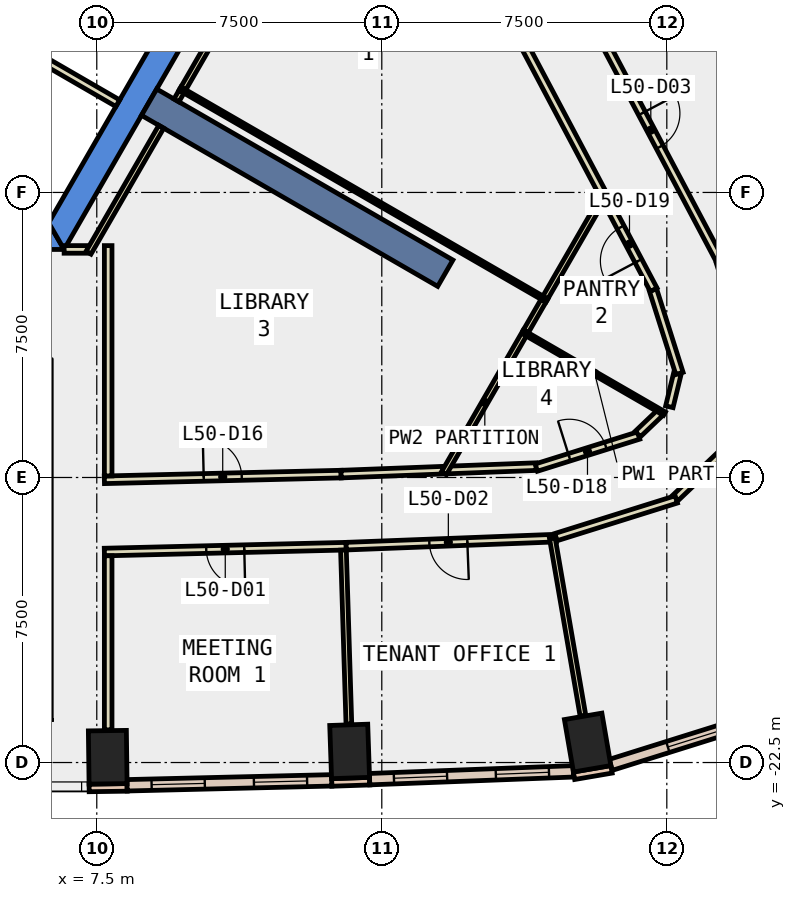
"""IFC4 building model, lengths in metres.
Left out: names, types, materials, properties, quantities, classifications, styles, units other than length and angle.
Written with IfcOpenShell. Run it as: python <this file> out.ifc"""

import sys

from ifc_helpers import new_model, si_unit, direction, frame, frame_2d, origin, origin_2d, place, context, subcontext, project, spatial, polyline, rectangle, outline, extrude, element, fill, save


model = new_model("IFC4")
c1 = context("Model", 3, precision=1e-05, world=origin(), true_north=direction((0.0, 1.0)))
c2 = subcontext(c1, "Body", "Model", "MODEL_VIEW")
j1 = project(units=[si_unit("LENGTHUNIT", "METRE"), si_unit("PLANEANGLEUNIT", "RADIAN")], contexts=[c1])
p1 = place(None, origin())
s1 = spatial("IfcSite", under=j1, at=p1, CompositionType="ELEMENT")
p2 = place(p1, origin())
s2 = spatial("IfcBuilding", under=s1, at=p2, CompositionType="ELEMENT")
p3 = place(p2, frame((0.0, 0.0, 223.4)))
s3 = spatial("IfcBuildingStorey", under=s2, at=p3, CompositionType="ELEMENT", Elevation=223.4)
for number, where, z_axis, x_axis in (
    (1, (7.788, -22.361, -0.4), (0.0, 0.0, 1.0), (1.0, 0.013, 0.0)),
    (2, (14.154, -22.208, -0.4), (0.0, 0.0, 1.0), (0.999, 0.034, 0.0)),
    (3, (20.417, -21.975, -0.4), (0.0, 0.0, 1.0), (0.986, 0.169, 0.0)),
):
    element("IfcColumn", number, at=place(p3, frame(where, z_axis=z_axis, x_axis=x_axis)), inside=s3, PredefinedType="COLUMN", context=c2, shape_type="SweptSolid", body=[
        extrude(rectangle(XDim=1.0, YDim=1.4, at=origin_2d()), origin(), (0.0, 0.0, 1.0), 4.2),
    ])
p4 = place(p3, frame((0.0, 0.0, -0.4)))
e4 = element("IfcWall", 4, at=p4, inside=s3, PredefinedType="SHEAR", context=c2, shape_type="SweptSolid", body=[
    extrude(outline(polyline([(5.75, -8.3), (5.75, -9.0), (6.64, -9.0), (6.235, -8.3), (5.75, -8.3)])), origin(), (0.0, 0.0, 1.0), 4.2),
])
p5 = place(p3, frame((0.0, 0.0, -0.4)))
e5 = element("IfcWall", 5, at=p5, inside=s3, PredefinedType="SHEAR", context=c2, shape_type="SweptSolid", body=[
    extrude(outline(polyline([(6.64, -9.0), (13.279, 2.5), (12.471, 2.5), (6.235, -8.3), (6.64, -9.0)])), origin(), (0.0, 0.0, 1.0), 4.2),
])
p6 = place(p3, frame((8.877, -5.125, -0.4), z_axis=(0.0, 0.0, 1.0), x_axis=(0.866017533419, -0.500013631625, 0.0)))
e6 = element("IfcWall", 6, at=p6, inside=s3, PredefinedType="SHEAR", context=c2, shape_type="SweptSolid", body=[
    extrude(rectangle(XDim=9.0, YDim=0.8, at=frame_2d((4.5, 0.0))), origin(), (0.0, 0.0, 1.0), 4.2),
])
p7 = place(p3, frame((7.299, -23.168, 0.0), z_axis=(0.0, 0.0, 1.0), x_axis=(0.999903186316, 0.013914668364, 0.0)))
e7 = element("IfcWall", 7, at=p7, inside=s3, PredefinedType="STANDARD", context=c2, shape_type="SweptSolid", body=[
    extrude(rectangle(XDim=1.0, YDim=0.2, at=frame_2d((0.5, 0.0))), origin(), (0.0, 0.0, 1.0), 3.8),
])
p8 = place(p3, frame((13.682, -23.024, 0.0), z_axis=(0.0, 0.0, 1.0), x_axis=(0.999423561854, 0.033949138587, 0.0)))
e8 = element("IfcWall", 8, at=p8, inside=s3, PredefinedType="STANDARD", context=c2, shape_type="SweptSolid", body=[
    extrude(rectangle(XDim=1.0, YDim=0.2, at=frame_2d((0.5, 0.0))), origin(), (0.0, 0.0, 1.0), 3.8),
])
p9 = place(p3, frame((20.059, -22.848, 0.0), z_axis=(0.0, 0.0, 1.0), x_axis=(0.985631544579, 0.168909615862, 0.0)))
e9 = element("IfcWall", 9, at=p9, inside=s3, PredefinedType="STANDARD", context=c2, shape_type="SweptSolid", body=[
    extrude(rectangle(XDim=1.0, YDim=0.2, at=frame_2d((0.5, 0.0))), origin(), (0.0, 0.0, 1.0), 3.8),
])
p10 = place(p3, frame((8.297, -23.099, 0.0), z_axis=(0.0, 0.0, 1.0), x_axis=(0.999708030006, 0.024163086341, 0.0)))
e10 = element("IfcWall", 10, at=p10, inside=s3, PredefinedType="STANDARD", context=c2, shape_type="SweptSolid", body=[
    extrude(rectangle(XDim=5.385, YDim=0.3, at=frame_2d((2.693, 0.0))), origin(), (0.0, 0.0, 1.0), 3.8),
])
p11 = place(p10, frame((0.646, 0.0, 0.9)))
e11 = element("IfcOpeningElement", 11, at=p11, cuts=e10, PredefinedType="OPENING", context=c2, shape_type="SweptSolid", body=[
    extrude(rectangle(XDim=1.4, YDim=2.6, at=frame_2d((0.7, 1.3))), frame((0.0, 0.16, 0.0), z_axis=(0.0, -1.0, 0.0), x_axis=(1.0, 0.0, 0.0)), (0.0, 0.0, 1.0), 0.32),
])
p12 = place(p10, frame((3.339, 0.0, 0.9)))
e12 = element("IfcOpeningElement", 12, at=p12, cuts=e10, PredefinedType="OPENING", context=c2, shape_type="SweptSolid", body=[
    extrude(rectangle(XDim=1.4, YDim=2.6, at=frame_2d((0.7, 1.3))), frame((0.0, 0.16, 0.0), z_axis=(0.0, -1.0, 0.0), x_axis=(1.0, 0.0, 0.0)), (0.0, 0.0, 1.0), 0.32),
])
p13 = place(p3, frame((14.679, -22.938, 0.0), z_axis=(0.0, 0.0, 1.0), x_axis=(0.99926218254, 0.038406907512, 0.0)))
e13 = element("IfcWall", 13, at=p13, inside=s3, PredefinedType="STANDARD", context=c2, shape_type="SweptSolid", body=[
    extrude(rectangle(XDim=5.365, YDim=0.3, at=frame_2d((2.683, 0.0))), origin(), (0.0, 0.0, 1.0), 3.8),
])
p14 = place(p13, frame((0.641, 0.0, 0.9)))
e14 = element("IfcOpeningElement", 14, at=p14, cuts=e13, PredefinedType="OPENING", context=c2, shape_type="SweptSolid", body=[
    extrude(rectangle(XDim=1.4, YDim=2.6, at=frame_2d((0.7, 1.3))), frame((0.0, 0.16, 0.0), z_axis=(0.0, -1.0, 0.0), x_axis=(1.0, 0.0, 0.0)), (0.0, 0.0, 1.0), 0.32),
])
p15 = place(p13, frame((3.324, 0.0, 0.9)))
e15 = element("IfcOpeningElement", 15, at=p15, cuts=e13, PredefinedType="OPENING", context=c2, shape_type="SweptSolid", body=[
    extrude(rectangle(XDim=1.4, YDim=2.6, at=frame_2d((0.7, 1.3))), frame((0.0, 0.16, 0.0), z_axis=(0.0, -1.0, 0.0), x_axis=(1.0, 0.0, 0.0)), (0.0, 0.0, 1.0), 0.32),
])
p16 = place(p3, frame((21.024, -22.562, 0.0), z_axis=(0.0, 0.0, 1.0), x_axis=(0.954297481837, 0.298858354675, 0.0)))
e16 = element("IfcWall", 16, at=p16, inside=s3, PredefinedType="STANDARD", context=c2, shape_type="SweptSolid", body=[
    extrude(rectangle(XDim=4.551, YDim=0.3, at=frame_2d((2.275, 0.0))), origin(), (0.0, 0.0, 1.0), 3.8),
])
p17 = place(p16, frame((1.575, 0.0, 0.9)))
e17 = element("IfcOpeningElement", 17, at=p17, cuts=e16, PredefinedType="OPENING", context=c2, shape_type="SweptSolid", body=[
    extrude(rectangle(XDim=1.4, YDim=2.6, at=frame_2d((0.7, 1.3))), frame((0.0, 0.16, 0.0), z_axis=(0.0, -1.0, 0.0), x_axis=(1.0, 0.0, 0.0)), (0.0, 0.0, 1.0), 0.32),
])
p18 = place(p3, frame((7.7, -15.061, 0.0), z_axis=(0.0, 0.0, 1.0), x_axis=(0.999709615165, 0.024097413707, 0.0)))
e18 = element("IfcWall", 18, at=p18, inside=s3, PredefinedType="PARTITIONING", context=c2, shape_type="SweptSolid", body=[
    extrude(rectangle(XDim=6.231, YDim=0.2, at=frame_2d((3.115, 0.0))), origin(), (0.0, 0.0, 1.0), 3.8),
])
p19 = place(p18, frame((2.615, 0.0, 0.0)))
e19 = element("IfcOpeningElement", 19, at=p19, cuts=e18, PredefinedType="OPENING", context=c2, shape_type="SweptSolid", body=[
    extrude(rectangle(XDim=1.0, YDim=2.1, at=frame_2d((0.5, 1.05))), frame((0.0, 0.11, 0.0), z_axis=(0.0, -1.0, 0.0), x_axis=(1.0, 0.0, 0.0)), (0.0, 0.0, 1.0), 0.22),
])
p20 = place(p3, frame((13.929, -14.911, 0.0), z_axis=(0.0, 0.0, 1.0), x_axis=(0.99926480204, 0.038338693307, 0.0)))
e20 = element("IfcWall", 20, at=p20, inside=s3, PredefinedType="PARTITIONING", context=c2, shape_type="SweptSolid", body=[
    extrude(rectangle(XDim=2.681, YDim=0.2, at=frame_2d((1.34, 0.0))), origin(), (0.0, 0.0, 1.0), 3.8),
])
p21 = place(p3, frame((20.882, -7.659, 0.0), z_axis=(0.0, 0.0, 1.0), x_axis=(-0.468206254133, 0.883619207346, 0.0)))
e21 = element("IfcWall", 21, at=p21, inside=s3, PredefinedType="PARTITIONING", context=c2, shape_type="SweptSolid", body=[
    extrude(rectangle(XDim=4.93, YDim=0.2, at=frame_2d((2.465, 0.0))), origin(), (0.0, 0.0, 1.0), 3.8),
])
p22 = place(p3, frame((16.757, -14.802, 0.0), z_axis=(0.0, 0.0, 1.0), x_axis=(0.999273784151, 0.038103862122, 0.0)))
e22 = element("IfcWall", 22, at=p22, inside=s3, PredefinedType="PARTITIONING", context=c2, shape_type="SweptSolid", body=[
    extrude(rectangle(XDim=2.307, YDim=0.2, at=frame_2d((1.153, 0.0))), origin(), (0.0, 0.0, 1.0), 3.8),
])
p23 = place(p3, frame((19.066, -14.74, 0.0), z_axis=(0.0, 0.0, 1.0), x_axis=(0.954238004552, 0.299048207935, 0.0)))
e23 = element("IfcWall", 23, at=p23, inside=s3, PredefinedType="PARTITIONING", context=c2, shape_type="SweptSolid", body=[
    extrude(rectangle(XDim=2.822, YDim=0.2, at=frame_2d((1.411, 0.0))), origin(), (0.0, 0.0, 1.0), 3.8),
])
p24 = place(p23, frame((0.911, 0.0, 0.0)))
e24 = element("IfcOpeningElement", 24, at=p24, cuts=e23, PredefinedType="OPENING", context=c2, shape_type="SweptSolid", body=[
    extrude(rectangle(XDim=1.0, YDim=2.1, at=frame_2d((0.5, 1.05))), frame((0.0, 0.11, 0.0), z_axis=(0.0, -1.0, 0.0), x_axis=(1.0, 0.0, 0.0)), (0.0, 0.0, 1.0), 0.22),
])
p25 = place(p3, frame((21.736, -13.857, 0.0), z_axis=(0.0, 0.0, 1.0), x_axis=(0.723666760573, 0.690149563241, 0.0)))
e25 = element("IfcWall", 25, at=p25, inside=s3, PredefinedType="PARTITIONING", context=c2, shape_type="SweptSolid", body=[
    extrude(rectangle(XDim=0.801, YDim=0.2, at=frame_2d((0.401, 0.0))), origin(), (0.0, 0.0, 1.0), 3.8),
])
p26 = place(p3, frame((22.567, -13.139, 0.0), z_axis=(0.0, 0.0, 1.0), x_axis=(0.2356388299, 0.971840697771, 0.0)))
e26 = element("IfcWall", 26, at=p26, inside=s3, PredefinedType="PARTITIONING", context=c2, shape_type="SweptSolid", body=[
    extrude(rectangle(XDim=0.9, YDim=0.2, at=frame_2d((0.45, 0.0))), origin(), (0.0, 0.0, 1.0), 3.8),
])
p27 = place(p3, frame((22.833, -12.262, 0.0), z_axis=(0.0, 0.0, 1.0), x_axis=(-0.302262657712, 0.953224677478, 0.0)))
e27 = element("IfcWall", 27, at=p27, inside=s3, PredefinedType="PARTITIONING", context=c2, shape_type="SweptSolid", body=[
    extrude(rectangle(XDim=2.303, YDim=0.2, at=frame_2d((1.151, 0.0))), origin(), (0.0, 0.0, 1.0), 3.8),
])
p28 = place(p3, frame((22.154, -10.06, 0.0), z_axis=(0.0, 0.0, 1.0), x_axis=(-0.468114756541, 0.883667683413, 0.0)))
e28 = element("IfcWall", 28, at=p28, inside=s3, PredefinedType="PARTITIONING", context=c2, shape_type="SweptSolid", body=[
    extrude(rectangle(XDim=2.717, YDim=0.2, at=frame_2d((1.359, 0.0))), origin(), (0.0, 0.0, 1.0), 3.8),
])
p29 = place(p28, frame((0.859, 0.0, 0.0)))
e29 = element("IfcOpeningElement", 29, at=p29, cuts=e28, PredefinedType="OPENING", context=c2, shape_type="SweptSolid", body=[
    extrude(rectangle(XDim=1.0, YDim=2.1, at=frame_2d((0.5, 1.05))), frame((0.0, 0.11, 0.0), z_axis=(0.0, -1.0, 0.0), x_axis=(1.0, 0.0, 0.0)), (0.0, 0.0, 1.0), 0.22),
])
p30 = place(p3, frame((14.063, -16.808, 0.0), z_axis=(0.0, 0.0, 1.0), x_axis=(-0.999707980382, -0.024165139379, 0.0)))
e30 = element("IfcWall", 30, at=p30, inside=s3, PredefinedType="PARTITIONING", context=c2, shape_type="SweptSolid", body=[
    extrude(rectangle(XDim=6.365, YDim=0.2, at=frame_2d((3.183, 0.0))), origin(), (0.0, 0.0, 1.0), 3.8),
])
p31 = place(p30, frame((2.683, 0.0, 0.0)))
e31 = element("IfcOpeningElement", 31, at=p31, cuts=e30, PredefinedType="OPENING", context=c2, shape_type="SweptSolid", body=[
    extrude(rectangle(XDim=1.0, YDim=2.1, at=frame_2d((0.5, 1.05))), frame((0.0, 0.11, 0.0), z_axis=(0.0, -1.0, 0.0), x_axis=(1.0, 0.0, 0.0)), (0.0, 0.0, 1.0), 0.22),
])
p32 = place(p3, frame((19.588, -16.595, 0.0), z_axis=(0.0, 0.0, 1.0), x_axis=(-0.999265212989, -0.038327980772, 0.0)))
e32 = element("IfcWall", 32, at=p32, inside=s3, PredefinedType="PARTITIONING", context=c2, shape_type="SweptSolid", body=[
    extrude(rectangle(XDim=5.529, YDim=0.2, at=frame_2d((2.765, 0.0))), origin(), (0.0, 0.0, 1.0), 3.8),
])
p33 = place(p32, frame((2.339, 0.0, 0.0)))
e33 = element("IfcOpeningElement", 33, at=p33, cuts=e32, PredefinedType="OPENING", context=c2, shape_type="SweptSolid", body=[
    extrude(rectangle(XDim=1.0, YDim=2.1, at=frame_2d((0.5, 1.05))), frame((0.0, 0.11, 0.0), z_axis=(0.0, -1.0, 0.0), x_axis=(1.0, 0.0, 0.0)), (0.0, 0.0, 1.0), 0.22),
])
p34 = place(p3, frame((20.245, -2.398, 0.0), z_axis=(0.0, 0.0, 1.0), x_axis=(0.468063775621, -0.883694688199, 0.0)))
e34 = element("IfcWall", 34, at=p34, inside=s3, PredefinedType="PARTITIONING", context=c2, shape_type="SweptSolid", body=[
    extrude(rectangle(XDim=7.836, YDim=0.2, at=frame_2d((3.918, 0.0))), origin(), (0.0, 0.0, 1.0), 3.8),
])
p35 = place(p34, frame((3.418, 0.0, 0.0)))
e35 = element("IfcOpeningElement", 35, at=p35, cuts=e34, PredefinedType="OPENING", context=c2, shape_type="SweptSolid", body=[
    extrude(rectangle(XDim=1.0, YDim=2.1, at=frame_2d((0.5, 1.05))), frame((0.0, 0.11, 0.0), z_axis=(0.0, -1.0, 0.0), x_axis=(1.0, 0.0, 0.0)), (0.0, 0.0, 1.0), 0.22),
])
p36 = place(p3, frame((23.897, -9.33, 0.0), z_axis=(0.0, 0.0, 1.0), x_axis=(0.302200639646, -0.953244340868, 0.0)))
e36 = element("IfcWall", 36, at=p36, inside=s3, PredefinedType="PARTITIONING", context=c2, shape_type="SweptSolid", body=[
    extrude(rectangle(XDim=3.004, YDim=0.2, at=frame_2d((1.502, 0.0))), origin(), (0.0, 0.0, 1.0), 3.8),
])
p37 = place(p3, frame((24.378, -13.964, 0.0), z_axis=(0.0, 0.0, 1.0), x_axis=(-0.723967420116, -0.689834164571, 0.0)))
e37 = element("IfcWall", 37, at=p37, inside=s3, PredefinedType="PARTITIONING", context=c2, shape_type="SweptSolid", body=[
    extrude(rectangle(XDim=2.282, YDim=0.2, at=frame_2d((1.141, 0.0))), origin(), (0.0, 0.0, 1.0), 3.8),
])
p38 = place(p3, frame((22.749, -15.577, 0.0), z_axis=(0.0, 0.0, 1.0), x_axis=(-0.954238750745, -0.299045826884, 0.0)))
e38 = element("IfcWall", 38, at=p38, inside=s3, PredefinedType="PARTITIONING", context=c2, shape_type="SweptSolid", body=[
    extrude(rectangle(XDim=3.318, YDim=0.2, at=frame_2d((1.659, 0.0))), origin(), (0.0, 0.0, 1.0), 3.8),
])
p39 = place(p3, frame((8.053, -5.152, 0.0), z_axis=(0.0, 0.0, 1.0), x_axis=(-0.865808344015, 0.500375770231, 0.0)))
e39 = element("IfcWall", 39, at=p39, inside=s3, PredefinedType="PARTITIONING", context=c2, shape_type="SweptSolid", body=[
    extrude(rectangle(XDim=2.9, YDim=0.2, at=frame_2d((1.45, 0.0))), origin(), (0.0, 0.0, 1.0), 3.8),
])
p40 = place(p3, frame((6.641, -8.999, 0.0), z_axis=(0.0, 0.0, 1.0), x_axis=(1.0, 0.0, 0.0)))
e40 = element("IfcWall", 40, at=p40, inside=s3, PredefinedType="PARTITIONING", context=c2, shape_type="SweptSolid", body=[
    extrude(rectangle(XDim=0.617, YDim=0.2, at=frame_2d((0.309, 0.0))), origin(), (0.0, 0.0, 1.0), 3.8),
])
p41 = place(p3, frame((7.283, -9.086, 0.0), z_axis=(0.0, 0.0, 1.0), x_axis=(0.500035303972, 0.866005020067, 0.0)))
e41 = element("IfcWall", 41, at=p41, inside=s3, PredefinedType="PARTITIONING", context=c2, shape_type="SweptSolid", body=[
    extrude(rectangle(XDim=3.828, YDim=0.15, at=frame_2d((1.914, 0.0))), origin(), (0.0, 0.0, 1.0), 3.8),
])
p42 = place(p3, frame((9.779, -4.762, 0.0), z_axis=(0.0, 0.0, 1.0), x_axis=(0.499990552429, 0.866030858274, 0.0)))
e42 = element("IfcWall", 42, at=p42, inside=s3, PredefinedType="PARTITIONING", context=c2, shape_type="SweptSolid", body=[
    extrude(rectangle(XDim=9.906, YDim=0.15, at=frame_2d((4.953, 0.0))), origin(), (0.0, 0.0, 1.0), 3.8),
])
p43 = place(p3, frame((7.8, -8.899, 0.0), z_axis=(0.0, 0.0, 1.0), x_axis=(0.0, -1.0, 0.0)))
e43 = element("IfcWall", 43, at=p43, inside=s3, PredefinedType="PARTITIONING", context=c2, shape_type="SweptSolid", body=[
    extrude(rectangle(XDim=6.06, YDim=0.2, at=frame_2d((3.03, 0.0))), origin(), (0.0, 0.0, 1.0), 3.8),
])
p44 = place(p3, frame((7.8, -17.059, 0.0), z_axis=(0.0, 0.0, 1.0), x_axis=(0.0, -1.0, 0.0)))
e44 = element("IfcWall", 44, at=p44, inside=s3, PredefinedType="PARTITIONING", context=c2, shape_type="SweptSolid", body=[
    extrude(rectangle(XDim=4.582, YDim=0.2, at=frame_2d((2.291, 0.0))), origin(), (0.0, 0.0, 1.0), 3.8),
])
p45 = place(p3, frame((9.689, -4.768, 0.0), z_axis=(0.0, 0.0, 1.0), x_axis=(0.866023322577, -0.500003604739, 0.0)))
e45 = element("IfcWall", 45, at=p45, inside=s3, PredefinedType="PARTITIONING", context=c2, shape_type="SweptSolid", body=[
    extrude(rectangle(XDim=11.15, YDim=0.1, at=frame_2d((5.575, 0.0))), origin(), (0.0, 0.0, 1.0), 3.8),
])
p46 = place(p3, frame((18.789, -11.156, 0.0), z_axis=(0.0, 0.0, 1.0), x_axis=(-0.499822078765, -0.866128102292, 0.0)))
e46 = element("IfcWall", 46, at=p46, inside=s3, PredefinedType="PARTITIONING", context=c2, shape_type="SweptSolid", body=[
    extrude(rectangle(XDim=4.313, YDim=0.15, at=frame_2d((2.157, 0.0))), origin(), (0.0, 0.0, 1.0), 3.8),
])
p47 = place(p3, frame((19.255, -10.349, 0.0), z_axis=(0.0, 0.0, 1.0), x_axis=(-0.499185199876, -0.866495318063, 0.0)))
e47 = element("IfcWall", 47, at=p47, inside=s3, PredefinedType="PARTITIONING", context=c2, shape_type="SweptSolid", body=[
    extrude(rectangle(XDim=0.931, YDim=0.15, at=frame_2d((0.466, 0.0))), origin(), (0.0, 0.0, 1.0), 3.8),
])
p48 = place(p3, frame((20.847, -7.593, 0.0), z_axis=(0.0, 0.0, 1.0), x_axis=(-0.500261762561, -0.865874222343, 0.0)))
e48 = element("IfcWall", 48, at=p48, inside=s3, PredefinedType="PARTITIONING", context=c2, shape_type="SweptSolid", body=[
    extrude(rectangle(XDim=3.082, YDim=0.15, at=frame_2d((1.541, 0.0))), origin(), (0.0, 0.0, 1.0), 3.8),
])
p49 = place(p3, frame((18.765, -11.199, 0.0), z_axis=(0.0, 0.0, 1.0), x_axis=(0.866038964406, -0.499976511579, 0.0)))
e49 = element("IfcWall", 49, at=p49, inside=s3, PredefinedType="PARTITIONING", context=c2, shape_type="SweptSolid", body=[
    extrude(rectangle(XDim=4.242, YDim=0.1, at=frame_2d((2.121, 0.0))), origin(), (0.0, 0.0, 1.0), 3.8),
])
p50 = place(p3, frame((13.991, -16.91, 0.0), z_axis=(0.0, 0.0, 1.0), x_axis=(0.031234752378, -0.999512076087, 0.0)))
e50 = element("IfcWall", 50, at=p50, inside=s3, PredefinedType="PARTITIONING", context=c2, shape_type="SweptSolid", body=[
    extrude(rectangle(XDim=4.58, YDim=0.15, at=frame_2d((2.29, 0.0))), origin(), (0.0, 0.0, 1.0), 3.8),
])
p51 = place(p3, frame((19.488, -16.599, 0.0), z_axis=(0.0, 0.0, 1.0), x_axis=(0.169963884325, -0.985450292011, 0.0)))
e51 = element("IfcWall", 51, at=p51, inside=s3, PredefinedType="PARTITIONING", context=c2, shape_type="SweptSolid", body=[
    extrude(rectangle(XDim=4.736, YDim=0.15, at=frame_2d((2.368, 0.0))), origin(), (0.0, 0.0, 1.0), 3.8),
])
p52 = place(p3, frame((9.596, -5.079, 0.0), z_axis=(0.0, 0.0, 1.0), x_axis=(0.500782702656, 0.865573038351, 0.0)))
e52 = element("IfcWall", 52, at=p52, inside=s3, PredefinedType="PARTITIONING", context=c2, shape_type="SweptSolid", body=[
    extrude(rectangle(XDim=0.266, YDim=0.15, at=frame_2d((0.133, 0.0))), origin(), (0.0, 0.0, 1.0), 3.8),
])
p53 = place(p3, frame((5.492, -3.788, 0.0), z_axis=(0.0, 0.0, 1.0), x_axis=(0.500034260056, 0.866005622828, 0.0)))
e53 = element("IfcWall", 53, at=p53, inside=s3, PredefinedType="STANDARD", context=c2, shape_type="SweptSolid", body=[
    extrude(rectangle(XDim=5.399, YDim=0.2, at=frame_2d((2.7, 0.0))), origin(), (0.0, 0.0, 1.0), 3.8),
])
p54 = place(p11, origin())
e54 = element("IfcWindow", 54, at=p54, inside=s3, PartitioningType="SINGLE_PANEL", PredefinedType="WINDOW", context=c2, shape_type="SweptSolid", body=[
    extrude(rectangle(XDim=1.4, YDim=2.6, at=frame_2d((0.7, 1.3))), frame((0.0, 0.03, 0.0), z_axis=(0.0, -1.0, 0.0), x_axis=(1.0, 0.0, 0.0)), (0.0, 0.0, 1.0), 0.06),
])
fill(e11, e54)
p55 = place(p12, origin())
e55 = element("IfcWindow", 55, at=p55, inside=s3, PartitioningType="SINGLE_PANEL", PredefinedType="WINDOW", context=c2, shape_type="SweptSolid", body=[
    extrude(rectangle(XDim=1.4, YDim=2.6, at=frame_2d((0.7, 1.3))), frame((0.0, 0.03, 0.0), z_axis=(0.0, -1.0, 0.0), x_axis=(1.0, 0.0, 0.0)), (0.0, 0.0, 1.0), 0.06),
])
fill(e12, e55)
p56 = place(p14, origin())
e56 = element("IfcWindow", 56, at=p56, inside=s3, PartitioningType="SINGLE_PANEL", PredefinedType="WINDOW", context=c2, shape_type="SweptSolid", body=[
    extrude(rectangle(XDim=1.4, YDim=2.6, at=frame_2d((0.7, 1.3))), frame((0.0, 0.03, 0.0), z_axis=(0.0, -1.0, 0.0), x_axis=(1.0, 0.0, 0.0)), (0.0, 0.0, 1.0), 0.06),
])
fill(e14, e56)
p57 = place(p15, origin())
e57 = element("IfcWindow", 57, at=p57, inside=s3, PartitioningType="SINGLE_PANEL", PredefinedType="WINDOW", context=c2, shape_type="SweptSolid", body=[
    extrude(rectangle(XDim=1.4, YDim=2.6, at=frame_2d((0.7, 1.3))), frame((0.0, 0.03, 0.0), z_axis=(0.0, -1.0, 0.0), x_axis=(1.0, 0.0, 0.0)), (0.0, 0.0, 1.0), 0.06),
])
fill(e15, e57)
p58 = place(p17, origin())
e58 = element("IfcWindow", 58, at=p58, inside=s3, PartitioningType="SINGLE_PANEL", PredefinedType="WINDOW", context=c2, shape_type="SweptSolid", body=[
    extrude(rectangle(XDim=1.4, YDim=2.6, at=frame_2d((0.7, 1.3))), frame((0.0, 0.03, 0.0), z_axis=(0.0, -1.0, 0.0), x_axis=(1.0, 0.0, 0.0)), (0.0, 0.0, 1.0), 0.06),
])
fill(e17, e58)
p59 = place(p31, origin())
e59 = element("IfcDoor", 59, at=p59, inside=s3, OperationType="SINGLE_SWING_LEFT", PredefinedType="DOOR", context=c2, shape_type="SweptSolid", body=[
    extrude(rectangle(XDim=1.0, YDim=2.1, at=frame_2d((0.5, 1.05))), frame((0.0, 0.025, 0.0), z_axis=(0.0, -1.0, 0.0), x_axis=(1.0, 0.0, 0.0)), (0.0, 0.0, 1.0), 0.05),
])
fill(e31, e59)
p60 = place(p33, origin())
e60 = element("IfcDoor", 60, at=p60, inside=s3, OperationType="SINGLE_SWING_LEFT", PredefinedType="DOOR", context=c2, shape_type="SweptSolid", body=[
    extrude(rectangle(XDim=1.0, YDim=2.1, at=frame_2d((0.5, 1.05))), frame((0.0, 0.025, 0.0), z_axis=(0.0, -1.0, 0.0), x_axis=(1.0, 0.0, 0.0)), (0.0, 0.0, 1.0), 0.05),
])
fill(e33, e60)
p61 = place(p35, origin())
e61 = element("IfcDoor", 61, at=p61, inside=s3, OperationType="SINGLE_SWING_LEFT", PredefinedType="DOOR", context=c2, shape_type="SweptSolid", body=[
    extrude(rectangle(XDim=1.0, YDim=2.1, at=frame_2d((0.5, 1.05))), frame((0.0, 0.025, 0.0), z_axis=(0.0, -1.0, 0.0), x_axis=(1.0, 0.0, 0.0)), (0.0, 0.0, 1.0), 0.05),
])
fill(e35, e61)
p62 = place(p19, origin())
e62 = element("IfcDoor", 62, at=p62, inside=s3, OperationType="SINGLE_SWING_LEFT", PredefinedType="DOOR", context=c2, shape_type="SweptSolid", body=[
    extrude(rectangle(XDim=1.0, YDim=2.1, at=frame_2d((0.5, 1.05))), frame((0.0, 0.025, 0.0), z_axis=(0.0, -1.0, 0.0), x_axis=(1.0, 0.0, 0.0)), (0.0, 0.0, 1.0), 0.05),
])
fill(e19, e62)
p63 = place(p24, origin())
e63 = element("IfcDoor", 63, at=p63, inside=s3, OperationType="SINGLE_SWING_LEFT", PredefinedType="DOOR", context=c2, shape_type="SweptSolid", body=[
    extrude(rectangle(XDim=1.0, YDim=2.1, at=frame_2d((0.5, 1.05))), frame((0.0, 0.025, 0.0), z_axis=(0.0, -1.0, 0.0), x_axis=(1.0, 0.0, 0.0)), (0.0, 0.0, 1.0), 0.05),
])
fill(e24, e63)
p64 = place(p29, origin())
e64 = element("IfcDoor", 64, at=p64, inside=s3, OperationType="SINGLE_SWING_LEFT", PredefinedType="DOOR", context=c2, shape_type="SweptSolid", body=[
    extrude(rectangle(XDim=1.0, YDim=2.1, at=frame_2d((0.5, 1.05))), frame((0.0, 0.025, 0.0), z_axis=(0.0, -1.0, 0.0), x_axis=(1.0, 0.0, 0.0)), (0.0, 0.0, 1.0), 0.05),
])
fill(e29, e64)
save(model, sys.argv[1])
